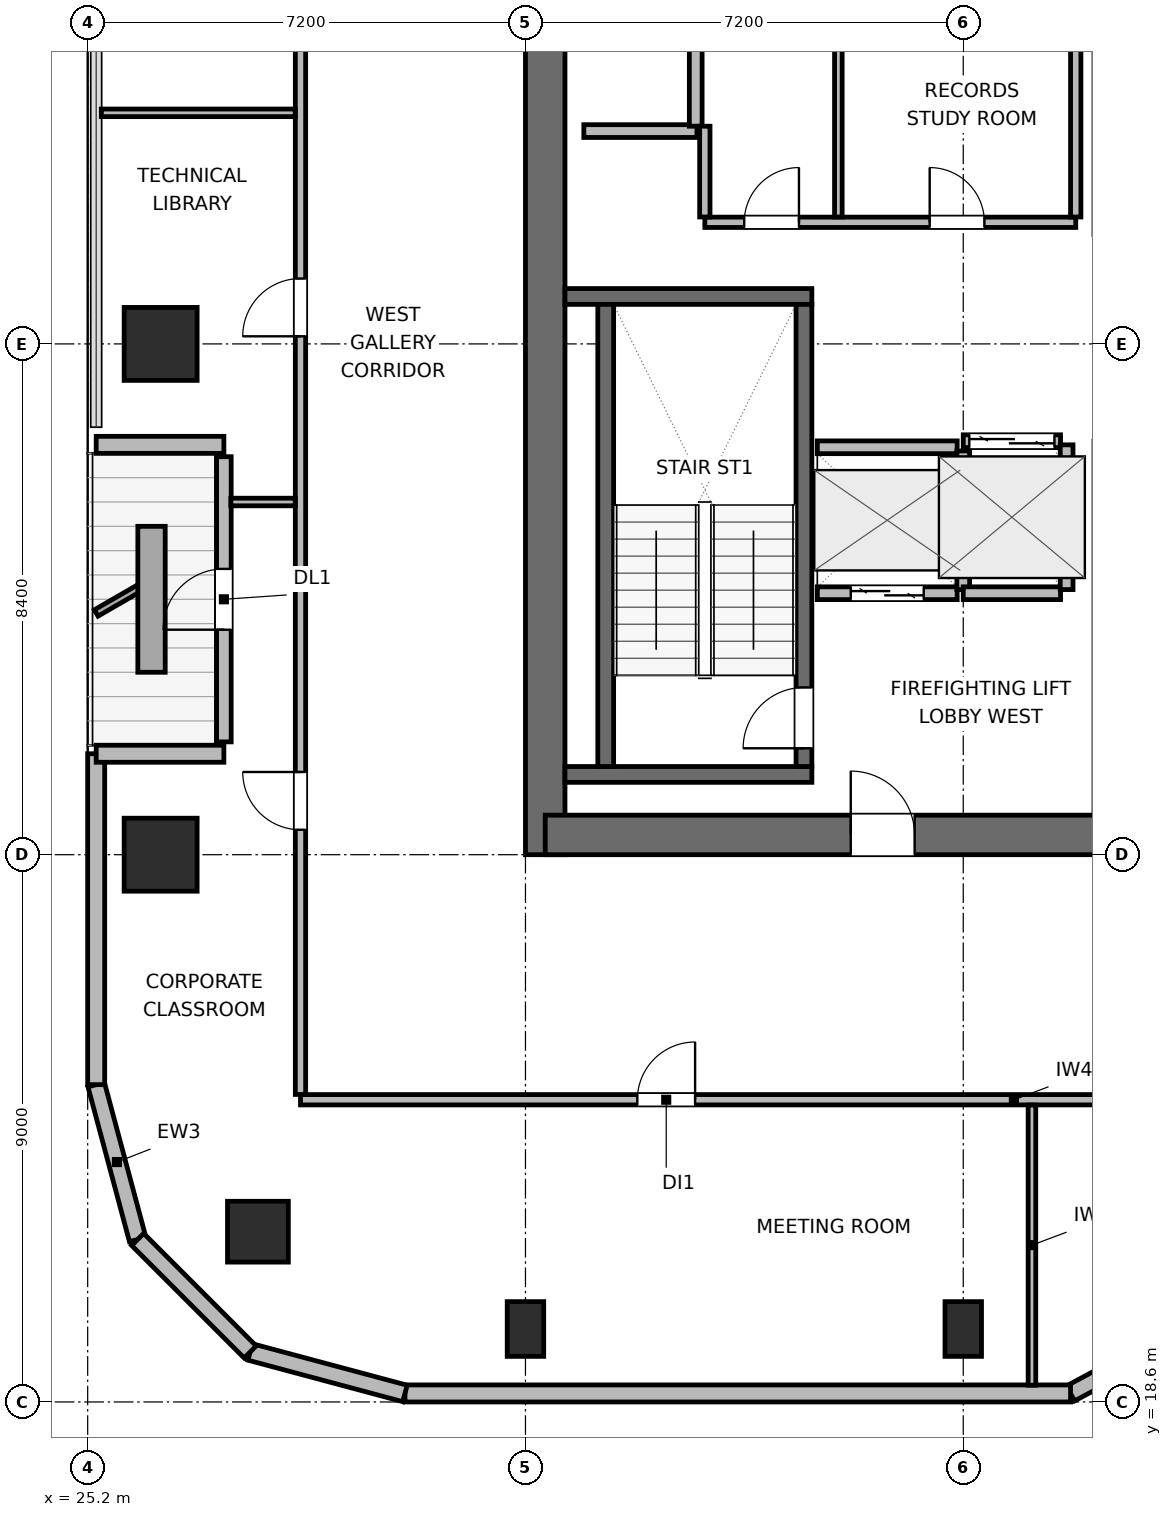
"""IFC4 building model, lengths in metres.
Left out: names, types, materials, properties, quantities, classifications, styles, units other than length and angle.
Written with IfcOpenShell. Run it as: python <this file> out.ifc"""

import sys

from ifc_helpers import new_model, si_unit, direction, frame, frame_2d, origin, origin_2d, place, context, subcontext, project, spatial, rectangle, circle, extrude, element, fill, save


model = new_model("IFC4")
c1 = context("Model", 3, precision=1e-05, world=origin(), true_north=direction((0.0, 1.0)))
c2 = subcontext(c1, "Body", "Model", "MODEL_VIEW")
j1 = project(units=[si_unit("LENGTHUNIT", "METRE"), si_unit("PLANEANGLEUNIT", "RADIAN")], contexts=[c1])
p1 = place(None, origin())
s1 = spatial("IfcSite", under=j1, at=p1, CompositionType="ELEMENT")
p2 = place(p1, origin())
s2 = spatial("IfcBuilding", under=s1, at=p2, CompositionType="ELEMENT")
p3 = place(p2, frame((0.0, 0.0, 223.2)))
s3 = spatial("IfcBuildingStorey", under=s2, at=p3, CompositionType="ELEMENT", Elevation=223.2)
p4 = place(p3, frame((32.725, 27.6, 0.0), z_axis=(0.0, 0.0, 1.0), x_axis=(0.0, 1.0, 0.0)))
e1 = element("IfcWall", 1, at=p4, inside=s3, PredefinedType="SHEAR", context=c2, shape_type="SweptSolid", body=[
    extrude(rectangle(XDim=16.8, YDim=0.65, at=frame_2d((8.4, 0.0))), origin(), (0.0, 0.0, 1.0), 3.9),
])
p5 = place(p3, frame((32.725, 27.925, 0.0), z_axis=(0.0, 0.0, 1.0), x_axis=(1.0, 0.0, 0.0)))
e2 = element("IfcWall", 2, at=p5, inside=s3, PredefinedType="SHEAR", context=c2, shape_type="SweptSolid", body=[
    extrude(rectangle(XDim=9.35, YDim=0.65, at=frame_2d((4.675, 0.0))), origin(), (0.0, 0.0, 1.0), 3.9),
])
p6 = place(p5, frame((5.025, 0.0, 0.0)))
e3 = element("IfcOpeningElement", 3, at=p6, cuts=e2, PredefinedType="OPENING", context=c2, shape_type="SweptSolid", body=[
    extrude(rectangle(XDim=1.05, YDim=2.04, at=frame_2d((0.525, 1.02))), frame((0.0, 0.335, 0.0), z_axis=(0.0, -1.0, 0.0), x_axis=(1.0, 0.0, 0.0)), (0.0, 0.0, 1.0), 0.67),
])
for number, where, z_axis, x_axis in (
    (4, (33.05, 28.92, 0.0), (0.0, 0.0, 1.0), (1.0, 0.0, 0.0)),
    (5, (33.05, 36.78, 0.0), (0.0, 0.0, 1.0), (1.0, 0.0, 0.0)),
):
    element("IfcWall", number, at=place(p3, frame(where, z_axis=z_axis, x_axis=x_axis)), inside=s3, PredefinedType="SHEAR", context=c2, shape_type="SweptSolid", body=[
        extrude(rectangle(XDim=4.06, YDim=0.26, at=frame_2d((2.03, 0.0))), origin(), (0.0, 0.0, 1.0), 3.9),
    ])
p7 = place(p3, frame((33.72, 29.05, 0.0), z_axis=(0.0, 0.0, 1.0), x_axis=(0.0, 1.0, 0.0)))
e6 = element("IfcWall", 6, at=p7, inside=s3, PredefinedType="SHEAR", context=c2, shape_type="SweptSolid", body=[
    extrude(rectangle(XDim=7.6, YDim=0.26, at=frame_2d((3.8, 0.0))), origin(), (0.0, 0.0, 1.0), 3.9),
])
p8 = place(p3, frame((36.98, 29.05, 0.0), z_axis=(0.0, 0.0, 1.0), x_axis=(0.0, 1.0, 0.0)))
e7 = element("IfcWall", 7, at=p8, inside=s3, PredefinedType="SHEAR", context=c2, shape_type="SweptSolid", body=[
    extrude(rectangle(XDim=7.6, YDim=0.26, at=frame_2d((3.8, 0.0))), origin(), (0.0, 0.0, 1.0), 3.9),
])
p9 = place(p8, frame((0.3, 0.0, 0.0)))
e8 = element("IfcOpeningElement", 8, at=p9, cuts=e7, PredefinedType="OPENING", context=c2, shape_type="SweptSolid", body=[
    extrude(rectangle(XDim=1.0, YDim=2.04, at=frame_2d((0.5, 1.02))), frame((0.0, 0.14, 0.0), z_axis=(0.0, -1.0, 0.0), x_axis=(1.0, 0.0, 0.0)), (0.0, 0.0, 1.0), 0.28),
])
p10 = place(p3, frame((28.0, 21.4, 0.0), z_axis=(0.0, 0.0, 1.0), x_axis=(1.0, 0.0, 0.0)))
e9 = element("IfcColumn", 9, at=p10, inside=s3, PredefinedType="COLUMN", context=c2, shape_type="SweptSolid", body=[
    extrude(circle(Radius=0.5, at=origin_2d()), origin(), (0.0, 0.0, 1.0), 3.9),
])
for number, where, z_axis, x_axis in (
    (10, (32.4, 19.8, 0.0), (0.0, 0.0, 1.0), (1.0, 0.0, 0.0)),
    (11, (39.6, 19.8, 0.0), (0.0, 0.0, 1.0), (1.0, 0.0, 0.0)),
):
    element("IfcColumn", number, at=place(p3, frame(where, z_axis=z_axis, x_axis=x_axis)), inside=s3, PredefinedType="COLUMN", context=c2, shape_type="SweptSolid", body=[
        extrude(rectangle(XDim=0.6, YDim=0.9, at=origin_2d()), origin(), (0.0, 0.0, 1.0), 3.9),
    ])
for number, where, z_axis, x_axis in (
    (12, (26.4, 27.6, 0.0), (0.0, 0.0, 1.0), (1.0, 0.0, 0.0)),
    (13, (26.4, 36.0, 0.0), (0.0, 0.0, 1.0), (1.0, 0.0, 0.0)),
):
    element("IfcColumn", number, at=place(p3, frame(where, z_axis=z_axis, x_axis=x_axis)), inside=s3, PredefinedType="COLUMN", context=c2, shape_type="SweptSolid", body=[
        extrude(rectangle(XDim=1.2, YDim=1.2, at=origin_2d()), origin(), (0.0, 0.0, 1.0), 3.9),
    ])
p11 = place(p3, frame((26.022, 21.272, 0.0), z_axis=(0.0, 0.0, 1.0), x_axis=(-0.2588904131, 0.965906700466, 0.0)))
e14 = element("IfcWall", 14, at=p11, inside=s3, PredefinedType="SOLIDWALL", context=c2, shape_type="SweptSolid", body=[
    extrude(rectangle(XDim=2.636, YDim=0.28, at=frame_2d((1.318, 0.0))), origin(), (0.0, 0.0, 1.0), 3.68),
])
p12 = place(p3, frame((25.34, 23.818, 0.0), z_axis=(0.0, 0.0, 1.0), x_axis=(0.0, 1.0, 0.0)))
e15 = element("IfcWall", 15, at=p12, inside=s3, PredefinedType="SOLIDWALL", context=c2, shape_type="SweptSolid", body=[
    extrude(rectangle(XDim=5.442, YDim=0.28, at=frame_2d((2.721, 0.0))), origin(), (0.0, 0.0, 1.0), 3.68),
])
p13 = place(p3, frame((25.34, 29.26, 0.0), z_axis=(0.0, 0.0, 1.0), x_axis=(1.0, 0.0, 0.0)))
e16 = element("IfcWall", 16, at=p13, inside=s3, PredefinedType="SOLIDWALL", context=c2, shape_type="SweptSolid", body=[
    extrude(rectangle(XDim=2.1, YDim=0.28, at=frame_2d((1.05, 0.0))), origin(), (0.0, 0.0, 1.0), 3.116),
])
p14 = place(p3, frame((27.44, 29.455, 0.0), z_axis=(0.0, 0.0, 1.0), x_axis=(0.0, 1.0, 0.0)))
e17 = element("IfcWall", 17, at=p14, inside=s3, PredefinedType="SOLIDWALL", context=c2, shape_type="SweptSolid", body=[
    extrude(rectangle(XDim=4.69, YDim=0.24, at=frame_2d((2.345, 0.0))), origin(), (0.0, 0.0, 1.0), 3.248),
])
p15 = place(p14, frame((1.845, 0.0, 0.0)))
e18 = element("IfcOpeningElement", 18, at=p15, cuts=e17, PredefinedType="OPENING", context=c2, shape_type="SweptSolid", body=[
    extrude(rectangle(XDim=1.0, YDim=2.02, at=frame_2d((0.5, 1.01))), frame((0.0, 0.13, 0.0), z_axis=(0.0, -1.0, 0.0), x_axis=(1.0, 0.0, 0.0)), (0.0, 0.0, 1.0), 0.26),
])
p16 = place(p3, frame((27.44, 34.34, 0.0), z_axis=(0.0, 0.0, 1.0), x_axis=(-1.0, 0.0, 0.0)))
e19 = element("IfcWall", 19, at=p16, inside=s3, PredefinedType="SOLIDWALL", context=c2, shape_type="SweptSolid", body=[
    extrude(rectangle(XDim=2.1, YDim=0.28, at=frame_2d((1.05, 0.0))), origin(), (0.0, 0.0, 1.0), 3.116),
])
p17 = place(p3, frame((42.46, 19.33, 0.0), z_axis=(0.0, 0.0, 1.0), x_axis=(-0.880515214249, -0.474017887296, 0.0)))
e20 = element("IfcWall", 20, at=p17, inside=s3, PredefinedType="SOLIDWALL", context=c2, shape_type="SweptSolid", body=[
    extrude(rectangle(XDim=1.244, YDim=0.28, at=frame_2d((0.622, 0.0))), origin(), (0.0, 0.0, 1.0), 3.68),
])
p18 = place(p3, frame((41.365, 18.74, 0.0), z_axis=(0.0, 0.0, 1.0), x_axis=(-1.0, 0.0, 0.0)))
e21 = element("IfcWall", 21, at=p18, inside=s3, PredefinedType="SOLIDWALL", context=c2, shape_type="SweptSolid", body=[
    extrude(rectangle(XDim=10.946, YDim=0.28, at=frame_2d((5.473, 0.0))), origin(), (0.0, 0.0, 1.0), 3.68),
])
p19 = place(p3, frame((30.418, 18.74, 0.0), z_axis=(0.0, 0.0, 1.0), x_axis=(-0.965883534663, 0.258976828051, 0.0)))
e22 = element("IfcWall", 22, at=p19, inside=s3, PredefinedType="SOLIDWALL", context=c2, shape_type="SweptSolid", body=[
    extrude(rectangle(XDim=2.636, YDim=0.28, at=frame_2d((1.318, 0.0))), origin(), (0.0, 0.0, 1.0), 3.68),
])
p20 = place(p3, frame((27.873, 19.423, 0.0), z_axis=(0.0, 0.0, 1.0), x_axis=(-0.707153437963, 0.707060121331, 0.0)))
e23 = element("IfcWall", 23, at=p20, inside=s3, PredefinedType="SOLIDWALL", context=c2, shape_type="SweptSolid", body=[
    extrude(rectangle(XDim=2.616, YDim=0.28, at=frame_2d((1.308, 0.0))), origin(), (0.0, 0.0, 1.0), 3.68),
])
p21 = place(p3, frame((33.36, 39.5, 0.0), z_axis=(0.0, 0.0, 1.0), x_axis=(1.0, 0.0, 0.0)))
e24 = element("IfcWall", 24, at=p21, inside=s3, PredefinedType="PARTITIONING", context=c2, shape_type="SweptSolid", body=[
    extrude(rectangle(XDim=1.86, YDim=0.21, at=frame_2d((0.93, 0.0))), origin(), (0.0, 0.0, 1.0), 3.68),
])
p22 = place(p3, frame((35.2, 39.58, 0.0), z_axis=(0.0, 0.0, 1.0), x_axis=(0.0, 1.0, 0.0)))
e25 = element("IfcWall", 25, at=p22, inside=s3, PredefinedType="PARTITIONING", context=c2, shape_type="SweptSolid", body=[
    extrude(rectangle(XDim=1.32, YDim=0.21, at=frame_2d((0.66, 0.0))), origin(), (0.0, 0.0, 1.0), 3.68),
])
p23 = place(p3, frame((37.2, 31.9, 0.0), z_axis=(0.0, 0.0, 1.0), x_axis=(1.0, 0.0, 0.0)))
e26 = element("IfcWall", 26, at=p23, inside=s3, PredefinedType="PARTITIONING", context=c2, shape_type="SweptSolid", body=[
    extrude(rectangle(XDim=2.3, YDim=0.21, at=frame_2d((1.15, 0.0))), origin(), (0.0, 0.0, 1.0), 3.68),
])
p24 = place(p23, frame((0.55, 0.0, 0.0)))
e27 = element("IfcOpeningElement", 27, at=p24, cuts=e26, PredefinedType="OPENING", context=c2, shape_type="SweptSolid", body=[
    extrude(rectangle(XDim=1.2, YDim=2.04, at=frame_2d((0.6, 1.02))), frame((0.0, 0.115, 0.0), z_axis=(0.0, -1.0, 0.0), x_axis=(1.0, 0.0, 0.0)), (0.0, 0.0, 1.0), 0.23),
])
p25 = place(p3, frame((37.2, 34.3, 0.0), z_axis=(0.0, 0.0, 1.0), x_axis=(1.0, 0.0, 0.0)))
e28 = element("IfcWall", 28, at=p25, inside=s3, PredefinedType="PARTITIONING", context=c2, shape_type="SweptSolid", body=[
    extrude(rectangle(XDim=2.3, YDim=0.21, at=frame_2d((1.15, 0.0))), origin(), (0.0, 0.0, 1.0), 3.68),
])
p26 = place(p3, frame((39.6, 31.96, 0.0), z_axis=(0.0, 0.0, 1.0), x_axis=(0.0, 1.0, 0.0)))
e29 = element("IfcWall", 29, at=p26, inside=s3, PredefinedType="PARTITIONING", context=c2, shape_type="SweptSolid", body=[
    extrude(rectangle(XDim=2.28, YDim=0.21, at=frame_2d((1.14, 0.0))), origin(), (0.0, 0.0, 1.0), 3.68),
])
p27 = place(p3, frame((39.6, 34.4, 0.0), z_axis=(0.0, 0.0, 1.0), x_axis=(1.0, 0.0, 0.0)))
e30 = element("IfcWall", 30, at=p27, inside=s3, PredefinedType="PARTITIONING", context=c2, shape_type="SweptSolid", body=[
    extrude(rectangle(XDim=1.6, YDim=0.21, at=frame_2d((0.8, 0.0))), origin(), (0.0, 0.0, 1.0), 3.68),
])
p28 = place(p27, frame((0.1, 0.0, 0.0)))
e31 = element("IfcOpeningElement", 31, at=p28, cuts=e30, PredefinedType="OPENING", context=c2, shape_type="SweptSolid", body=[
    extrude(rectangle(XDim=1.4, YDim=2.06, at=frame_2d((0.7, 1.03))), frame((0.0, 0.115, 0.0), z_axis=(0.0, -1.0, 0.0), x_axis=(1.0, 0.0, 0.0)), (0.0, 0.0, 1.0), 0.23),
])
p29 = place(p3, frame((39.6, 31.9, 0.0), z_axis=(0.0, 0.0, 1.0), x_axis=(1.0, 0.0, 0.0)))
e32 = element("IfcWall", 32, at=p29, inside=s3, PredefinedType="PARTITIONING", context=c2, shape_type="SweptSolid", body=[
    extrude(rectangle(XDim=1.6, YDim=0.21, at=frame_2d((0.8, 0.0))), origin(), (0.0, 0.0, 1.0), 3.68),
])
p30 = place(p3, frame((41.3, 31.96, 0.0), z_axis=(0.0, 0.0, 1.0), x_axis=(0.0, 1.0, 0.0)))
e33 = element("IfcWall", 33, at=p30, inside=s3, PredefinedType="PARTITIONING", context=c2, shape_type="SweptSolid", body=[
    extrude(rectangle(XDim=2.38, YDim=0.21, at=frame_2d((1.19, 0.0))), origin(), (0.0, 0.0, 1.0), 3.68),
])
p31 = place(p3, frame((35.35, 38.0, 0.0), z_axis=(0.0, 0.0, 1.0), x_axis=(1.0, 0.0, 0.0)))
e34 = element("IfcWall", 34, at=p31, inside=s3, PredefinedType="PARTITIONING", context=c2, shape_type="SweptSolid", body=[
    extrude(rectangle(XDim=6.1, YDim=0.17, at=frame_2d((3.05, 0.0))), origin(), (0.0, 0.0, 1.0), 3.68),
])
p32 = place(p31, frame((0.648, 0.0, 0.0)))
e35 = element("IfcOpeningElement", 35, at=p32, cuts=e34, PredefinedType="OPENING", context=c2, shape_type="SweptSolid", body=[
    extrude(rectangle(XDim=0.9, YDim=2.02, at=frame_2d((0.45, 1.01))), frame((0.0, 0.095, 0.0), z_axis=(0.0, -1.0, 0.0), x_axis=(1.0, 0.0, 0.0)), (0.0, 0.0, 1.0), 0.19),
])
p33 = place(p31, frame((3.698, 0.0, 0.0)))
e36 = element("IfcOpeningElement", 36, at=p33, cuts=e34, PredefinedType="OPENING", context=c2, shape_type="SweptSolid", body=[
    extrude(rectangle(XDim=0.9, YDim=2.02, at=frame_2d((0.45, 1.01))), frame((0.0, 0.095, 0.0), z_axis=(0.0, -1.0, 0.0), x_axis=(1.0, 0.0, 0.0)), (0.0, 0.0, 1.0), 0.19),
])
p34 = place(p3, frame((35.35, 38.087, 0.0), z_axis=(0.0, 0.0, 1.0), x_axis=(0.0, 1.0, 0.0)))
e37 = element("IfcWall", 37, at=p34, inside=s3, PredefinedType="PARTITIONING", context=c2, shape_type="SweptSolid", body=[
    extrude(rectangle(XDim=1.493, YDim=0.17, at=frame_2d((0.747, 0.0))), origin(), (0.0, 0.0, 1.0), 3.68),
])
p35 = place(p3, frame((41.45, 38.087, 0.0), z_axis=(0.0, 0.0, 1.0), x_axis=(0.0, 1.0, 0.0)))
e38 = element("IfcWall", 38, at=p35, inside=s3, PredefinedType="PARTITIONING", context=c2, shape_type="SweptSolid", body=[
    extrude(rectangle(XDim=2.813, YDim=0.17, at=frame_2d((1.406, 0.0))), origin(), (0.0, 0.0, 1.0), 3.68),
])
p36 = place(p3, frame((37.546, 38.087, 0.0), z_axis=(0.0, 0.0, 1.0), x_axis=(0.0, 1.0, 0.0)))
e39 = element("IfcWall", 39, at=p36, inside=s3, PredefinedType="PARTITIONING", context=c2, shape_type="SweptSolid", body=[
    extrude(rectangle(XDim=2.813, YDim=0.125, at=frame_2d((1.406, 0.0))), origin(), (0.0, 0.0, 1.0), 3.68),
])
p37 = place(p3, frame((28.7, 23.57, 0.0), z_axis=(0.0, 0.0, 1.0), x_axis=(1.0, 0.0, 0.0)))
e40 = element("IfcWall", 40, at=p37, inside=s3, PredefinedType="PARTITIONING", context=c2, shape_type="SweptSolid", body=[
    extrude(rectangle(XDim=34.9, YDim=0.17, at=frame_2d((17.45, 0.0))), origin(), (0.0, 0.0, 1.0), 3.68),
])
p38 = place(p37, frame((5.54, 0.0, 0.0)))
e41 = element("IfcOpeningElement", 41, at=p38, cuts=e40, PredefinedType="OPENING", context=c2, shape_type="SweptSolid", body=[
    extrude(rectangle(XDim=0.95, YDim=2.04, at=frame_2d((0.475, 1.02))), frame((0.0, 0.095, 0.0), z_axis=(0.0, -1.0, 0.0), x_axis=(1.0, 0.0, 0.0)), (0.0, 0.0, 1.0), 0.19),
])
p39 = place(p37, frame((16.975, 0.0, 0.0)))
e42 = element("IfcOpeningElement", 42, at=p39, cuts=e40, PredefinedType="OPENING", context=c2, shape_type="SweptSolid", body=[
    extrude(rectangle(XDim=0.95, YDim=2.04, at=frame_2d((0.475, 1.02))), frame((0.0, 0.095, 0.0), z_axis=(0.0, -1.0, 0.0), x_axis=(1.0, 0.0, 0.0)), (0.0, 0.0, 1.0), 0.19),
])
p40 = place(p37, frame((28.41, 0.0, 0.0)))
e43 = element("IfcOpeningElement", 43, at=p40, cuts=e40, PredefinedType="OPENING", context=c2, shape_type="SweptSolid", body=[
    extrude(rectangle(XDim=0.95, YDim=2.04, at=frame_2d((0.475, 1.02))), frame((0.0, 0.095, 0.0), z_axis=(0.0, -1.0, 0.0), x_axis=(1.0, 0.0, 0.0)), (0.0, 0.0, 1.0), 0.19),
])
p41 = place(p3, frame((28.7, 23.657, 0.0), z_axis=(0.0, 0.0, 1.0), x_axis=(0.0, 1.0, 0.0)))
e44 = element("IfcWall", 44, at=p41, inside=s3, PredefinedType="PARTITIONING", context=c2, shape_type="SweptSolid", body=[
    extrude(rectangle(XDim=24.686, YDim=0.17, at=frame_2d((12.343, 0.0))), origin(), (0.0, 0.0, 1.0), 3.68),
])
p42 = place(p41, frame((4.353, 0.0, 0.0)))
e45 = element("IfcOpeningElement", 45, at=p42, cuts=e44, PredefinedType="OPENING", context=c2, shape_type="SweptSolid", body=[
    extrude(rectangle(XDim=0.95, YDim=2.04, at=frame_2d((0.475, 1.02))), frame((0.0, 0.095, 0.0), z_axis=(0.0, -1.0, 0.0), x_axis=(1.0, 0.0, 0.0)), (0.0, 0.0, 1.0), 0.19),
])
p43 = place(p41, frame((12.468, 0.0, 0.0)))
e46 = element("IfcOpeningElement", 46, at=p43, cuts=e44, PredefinedType="OPENING", context=c2, shape_type="SweptSolid", body=[
    extrude(rectangle(XDim=0.95, YDim=2.04, at=frame_2d((0.475, 1.02))), frame((0.0, 0.095, 0.0), z_axis=(0.0, -1.0, 0.0), x_axis=(1.0, 0.0, 0.0)), (0.0, 0.0, 1.0), 0.19),
])
p44 = place(p41, frame((19.983, 0.0, 0.0)))
e47 = element("IfcOpeningElement", 47, at=p44, cuts=e44, PredefinedType="OPENING", context=c2, shape_type="SweptSolid", body=[
    extrude(rectangle(XDim=0.95, YDim=2.04, at=frame_2d((0.475, 1.02))), frame((0.0, 0.095, 0.0), z_axis=(0.0, -1.0, 0.0), x_axis=(1.0, 0.0, 0.0)), (0.0, 0.0, 1.0), 0.19),
])
p45 = place(p3, frame((40.73, 18.875, 0.0), z_axis=(0.0, 0.0, 1.0), x_axis=(0.0, 1.0, 0.0)))
e48 = element("IfcWall", 48, at=p45, inside=s3, PredefinedType="PARTITIONING", context=c2, shape_type="SweptSolid", body=[
    extrude(rectangle(XDim=4.608, YDim=0.125, at=frame_2d((2.304, 0.0))), origin(), (0.0, 0.0, 1.0), 3.043),
])
p46 = place(p3, frame((27.555, 33.4, 0.0), z_axis=(0.0, 0.0, 1.0), x_axis=(1.0, 0.0, 0.0)))
e49 = element("IfcWall", 49, at=p46, inside=s3, PredefinedType="PARTITIONING", context=c2, shape_type="SweptSolid", body=[
    extrude(rectangle(XDim=1.058, YDim=0.125, at=frame_2d((0.529, 0.0))), origin(), (0.0, 0.0, 1.0), 3.68),
])
p47 = place(p3, frame((25.425, 39.8, 0.0), z_axis=(0.0, 0.0, 1.0), x_axis=(1.0, 0.0, 0.0)))
e50 = element("IfcWall", 50, at=p47, inside=s3, PredefinedType="PARTITIONING", context=c2, shape_type="SweptSolid", body=[
    extrude(rectangle(XDim=3.188, YDim=0.125, at=frame_2d((1.594, 0.0))), origin(), (0.0, 0.0, 1.0), 3.68),
])
p48 = place(p15, origin())
e51 = element("IfcDoor", 51, at=p48, inside=s3, OperationType="SINGLE_SWING_LEFT", PredefinedType="DOOR", context=c2, shape_type="SweptSolid", body=[
    extrude(rectangle(XDim=1.0, YDim=2.02, at=frame_2d((0.5, 1.01))), frame((0.0, 0.025, 0.0), z_axis=(0.0, -1.0, 0.0), x_axis=(1.0, 0.0, 0.0)), (0.0, 0.0, 1.0), 0.05),
])
fill(e18, e51)
p49 = place(p9, origin())
e52 = element("IfcDoor", 52, at=p49, inside=s3, OperationType="SINGLE_SWING_LEFT", PredefinedType="DOOR", context=c2, shape_type="SweptSolid", body=[
    extrude(rectangle(XDim=1.0, YDim=2.04, at=frame_2d((0.5, 1.02))), frame((0.0, 0.025, 0.0), z_axis=(0.0, -1.0, 0.0), x_axis=(1.0, 0.0, 0.0)), (0.0, 0.0, 1.0), 0.05),
])
fill(e8, e52)
p50 = place(p24, origin())
e53 = element("IfcDoor", 53, at=p50, inside=s3, OperationType="DOUBLE_DOOR_SLIDING", PredefinedType="DOOR", context=c2, shape_type="SweptSolid", body=[
    extrude(rectangle(XDim=1.2, YDim=2.04, at=frame_2d((0.6, 1.02))), frame((0.0, 0.025, 0.0), z_axis=(0.0, -1.0, 0.0), x_axis=(1.0, 0.0, 0.0)), (0.0, 0.0, 1.0), 0.05),
])
fill(e27, e53)
p51 = place(p28, origin())
e54 = element("IfcDoor", 54, at=p51, inside=s3, OperationType="DOUBLE_DOOR_SLIDING", PredefinedType="DOOR", context=c2, shape_type="SweptSolid", body=[
    extrude(rectangle(XDim=1.4, YDim=2.06, at=frame_2d((0.7, 1.03))), frame((0.0, 0.025, 0.0), z_axis=(0.0, -1.0, 0.0), x_axis=(1.0, 0.0, 0.0)), (0.0, 0.0, 1.0), 0.05),
])
fill(e31, e54)
p52 = place(p6, origin())
e55 = element("IfcDoor", 55, at=p52, inside=s3, OperationType="SINGLE_SWING_LEFT", PredefinedType="DOOR", context=c2, shape_type="SweptSolid", body=[
    extrude(rectangle(XDim=1.05, YDim=2.04, at=frame_2d((0.525, 1.02))), frame((0.0, 0.025, 0.0), z_axis=(0.0, -1.0, 0.0), x_axis=(1.0, 0.0, 0.0)), (0.0, 0.0, 1.0), 0.05),
])
fill(e3, e55)
p53 = place(p32, origin())
e56 = element("IfcDoor", 56, at=p53, inside=s3, OperationType="SINGLE_SWING_RIGHT", PredefinedType="DOOR", context=c2, shape_type="SweptSolid", body=[
    extrude(rectangle(XDim=0.9, YDim=2.02, at=frame_2d((0.45, 1.01))), frame((0.0, 0.025, 0.0), z_axis=(0.0, -1.0, 0.0), x_axis=(1.0, 0.0, 0.0)), (0.0, 0.0, 1.0), 0.05),
])
fill(e35, e56)
p54 = place(p33, origin())
e57 = element("IfcDoor", 57, at=p54, inside=s3, OperationType="SINGLE_SWING_LEFT", PredefinedType="DOOR", context=c2, shape_type="SweptSolid", body=[
    extrude(rectangle(XDim=0.9, YDim=2.02, at=frame_2d((0.45, 1.01))), frame((0.0, 0.025, 0.0), z_axis=(0.0, -1.0, 0.0), x_axis=(1.0, 0.0, 0.0)), (0.0, 0.0, 1.0), 0.05),
])
fill(e36, e57)
p55 = place(p38, origin())
e58 = element("IfcDoor", 58, at=p55, inside=s3, OperationType="SINGLE_SWING_RIGHT", PredefinedType="DOOR", context=c2, shape_type="SweptSolid", body=[
    extrude(rectangle(XDim=0.95, YDim=2.04, at=frame_2d((0.475, 1.02))), frame((0.0, 0.025, 0.0), z_axis=(0.0, -1.0, 0.0), x_axis=(1.0, 0.0, 0.0)), (0.0, 0.0, 1.0), 0.05),
])
fill(e41, e58)
p56 = place(p42, origin())
e59 = element("IfcDoor", 59, at=p56, inside=s3, OperationType="SINGLE_SWING_RIGHT", PredefinedType="DOOR", context=c2, shape_type="SweptSolid", body=[
    extrude(rectangle(XDim=0.95, YDim=2.04, at=frame_2d((0.475, 1.02))), frame((0.0, 0.025, 0.0), z_axis=(0.0, -1.0, 0.0), x_axis=(1.0, 0.0, 0.0)), (0.0, 0.0, 1.0), 0.05),
])
fill(e45, e59)
p57 = place(p43, origin())
e60 = element("IfcDoor", 60, at=p57, inside=s3, OperationType="SINGLE_SWING_LEFT", PredefinedType="DOOR", context=c2, shape_type="SweptSolid", body=[
    extrude(rectangle(XDim=0.95, YDim=2.04, at=frame_2d((0.475, 1.02))), frame((0.0, 0.025, 0.0), z_axis=(0.0, -1.0, 0.0), x_axis=(1.0, 0.0, 0.0)), (0.0, 0.0, 1.0), 0.05),
])
fill(e46, e60)
save(model, sys.argv[1])
